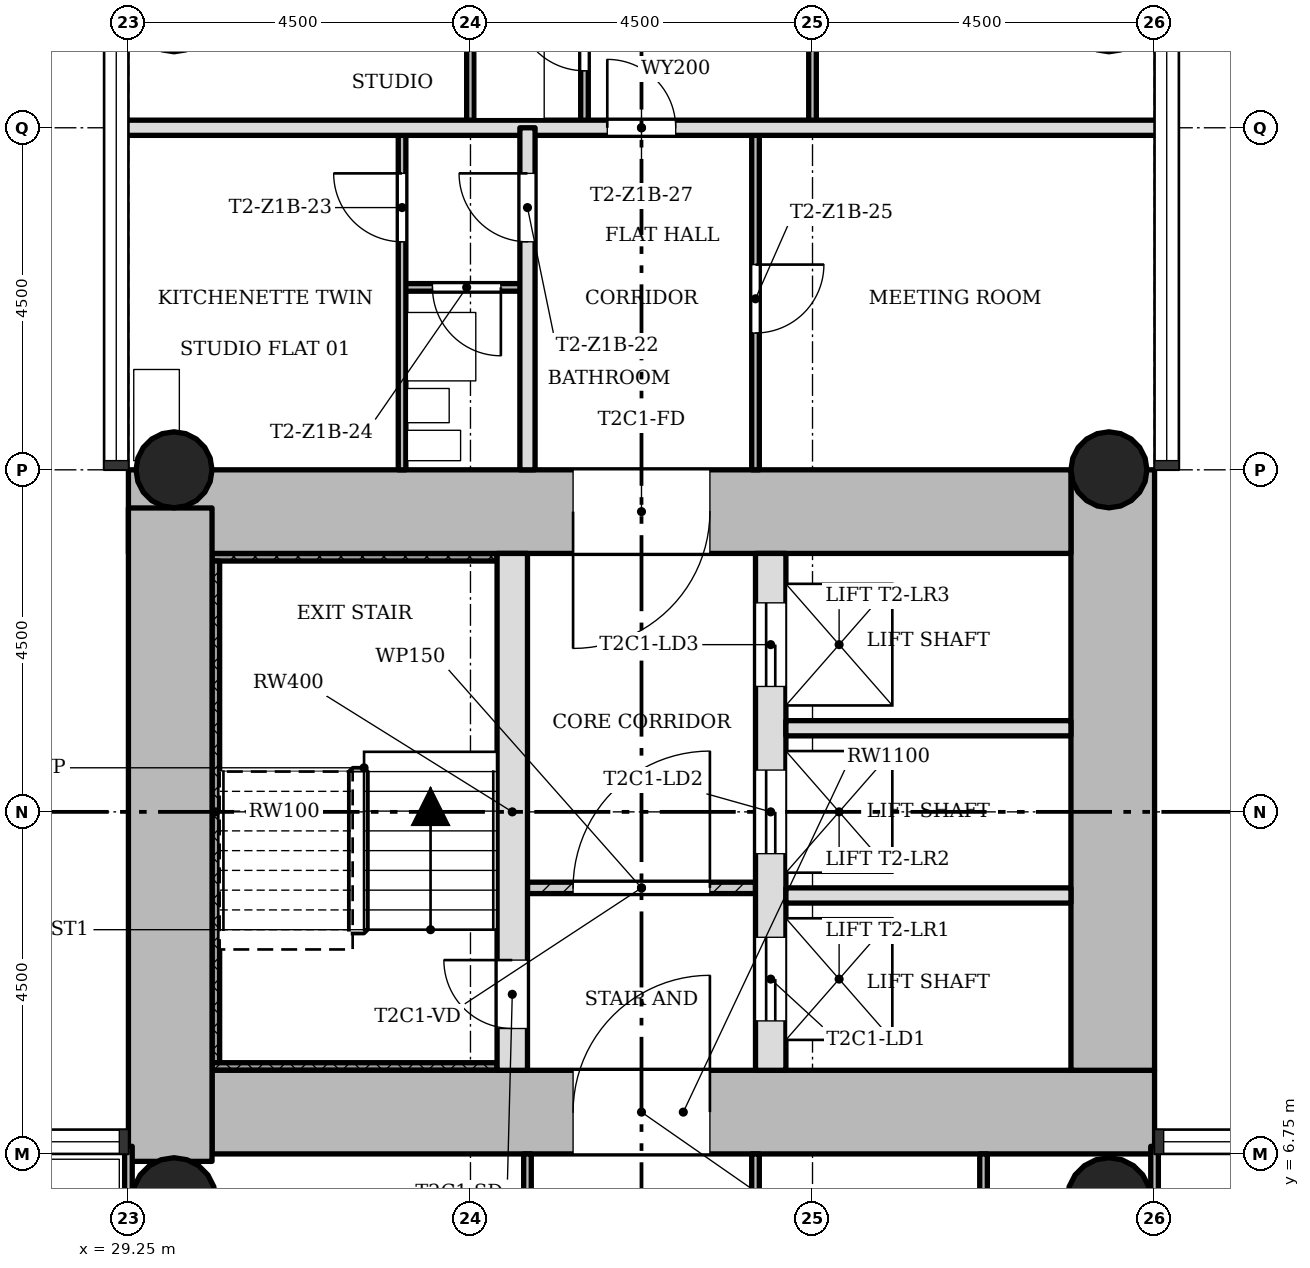
"""IFC4 building model, lengths in metres.
Left out: names, types, materials, properties, quantities, classifications, styles, units other than length and angle.
Written with IfcOpenShell. Run it as: python <this file> out.ifc"""

import sys

from ifc_helpers import new_model, si_unit, direction, frame, frame_2d, origin, origin_2d, place, context, subcontext, project, spatial, rectangle, hollow_circle, extrude, element, fill, save


model = new_model("IFC4")
c1 = context("Model", 3, precision=1e-05, world=origin(), true_north=direction((0.0, 1.0)))
c2 = subcontext(c1, "Body", "Model", "MODEL_VIEW")
j1 = project(units=[si_unit("LENGTHUNIT", "METRE"), si_unit("PLANEANGLEUNIT", "RADIAN")], contexts=[c1])
p1 = place(None, origin())
s1 = spatial("IfcSite", under=j1, at=p1, CompositionType="ELEMENT")
p2 = place(p1, origin())
s2 = spatial("IfcBuilding", under=s1, at=p2, CompositionType="ELEMENT")
p3 = place(p2, frame((0.0, 0.0, 34.7)))
s3 = spatial("IfcBuildingStorey", under=s2, at=p3, CompositionType="ELEMENT", Elevation=34.7)
p4 = place(p3, frame((30.35, 7.3, 0.0), z_axis=(0.0, 0.0, 1.0), x_axis=(1.0, 0.0, 0.0)))
e1 = element("IfcWall", 1, at=p4, inside=s3, PredefinedType="SHEAR", context=c2, shape_type="SweptSolid", body=[
    extrude(rectangle(XDim=12.4, YDim=1.1, at=frame_2d((6.2, 0.0))), origin(), (0.0, 0.0, 1.0), 3.4),
])
p5 = place(p4, frame((4.75, 0.0, 0.0)))
e2 = element("IfcOpeningElement", 2, at=p5, cuts=e1, PredefinedType="OPENING", context=c2, shape_type="SweptSolid", body=[
    extrude(rectangle(XDim=1.8, YDim=2.1, at=frame_2d((0.9, 1.05))), frame((0.0, 0.56, 0.0), z_axis=(0.0, -1.0, 0.0), x_axis=(1.0, 0.0, 0.0)), (0.0, 0.0, 1.0), 1.12),
])
p6 = place(p3, frame((42.2, 7.85, 0.0), z_axis=(0.0, 0.0, 1.0), x_axis=(0.0, 1.0, 0.0)))
e3 = element("IfcWall", 3, at=p6, inside=s3, PredefinedType="SHEAR", context=c2, shape_type="SweptSolid", body=[
    extrude(rectangle(XDim=7.9, YDim=1.1, at=frame_2d((3.95, 0.0))), origin(), (0.0, 0.0, 1.0), 3.4),
])
p7 = place(p3, frame((41.65, 15.2, 0.0), z_axis=(0.0, 0.0, 1.0), x_axis=(-1.0, 0.0, 0.0)))
e4 = element("IfcWall", 4, at=p7, inside=s3, PredefinedType="SHEAR", context=c2, shape_type="SweptSolid", body=[
    extrude(rectangle(XDim=12.4, YDim=1.1, at=frame_2d((6.2, 0.0))), origin(), (0.0, 0.0, 1.0), 3.4),
])
p8 = place(p7, frame((4.75, 0.0, 0.0)))
e5 = element("IfcOpeningElement", 5, at=p8, cuts=e4, PredefinedType="OPENING", context=c2, shape_type="SweptSolid", body=[
    extrude(rectangle(XDim=1.8, YDim=2.1, at=frame_2d((0.9, 1.05))), frame((0.0, 0.56, 0.0), z_axis=(0.0, -1.0, 0.0), x_axis=(1.0, 0.0, 0.0)), (0.0, 0.0, 1.0), 1.12),
])
p9 = place(p3, frame((29.8, 15.248, 0.0), z_axis=(0.0, 0.0, 1.0), x_axis=(0.0, -1.0, 0.0)))
e6 = element("IfcWall", 6, at=p9, inside=s3, PredefinedType="SHEAR", context=c2, shape_type="SweptSolid", body=[
    extrude(rectangle(XDim=8.596, YDim=1.1, at=frame_2d((4.298, 0.0))), origin(), (0.0, 0.0, 1.0), 3.4),
])
p10 = place(p3, frame((34.3, 7.85, 0.0), z_axis=(0.0, 0.0, 1.0), x_axis=(0.0, 1.0, 0.0)))
e7 = element("IfcWall", 7, at=p10, inside=s3, PredefinedType="SHEAR", context=c2, shape_type="SweptSolid", body=[
    extrude(rectangle(XDim=6.8, YDim=0.4, at=frame_2d((3.4, 0.0))), origin(), (0.0, 0.0, 1.0), 3.4),
])
p11 = place(p10, frame((0.55, 0.0, 0.0)))
e8 = element("IfcOpeningElement", 8, at=p11, cuts=e7, PredefinedType="OPENING", context=c2, shape_type="SweptSolid", body=[
    extrude(rectangle(XDim=0.9, YDim=2.1, at=frame_2d((0.45, 1.05))), frame((0.0, 0.21, 0.0), z_axis=(0.0, -1.0, 0.0), x_axis=(1.0, 0.0, 0.0)), (0.0, 0.0, 1.0), 0.42),
])
p12 = place(p3, frame((37.7, 7.85, 0.0), z_axis=(0.0, 0.0, 1.0), x_axis=(0.0, 1.0, 0.0)))
e9 = element("IfcWall", 9, at=p12, inside=s3, PredefinedType="SHEAR", context=c2, shape_type="SweptSolid", body=[
    extrude(rectangle(XDim=6.8, YDim=0.4, at=frame_2d((3.4, 0.0))), origin(), (0.0, 0.0, 1.0), 3.4),
])
p13 = place(p12, frame((0.65, 0.0, 0.0)))
e10 = element("IfcOpeningElement", 10, at=p13, cuts=e9, PredefinedType="OPENING", context=c2, shape_type="SweptSolid", body=[
    extrude(rectangle(XDim=1.1, YDim=2.1, at=frame_2d((0.55, 1.05))), frame((0.0, 0.21, 0.0), z_axis=(0.0, -1.0, 0.0), x_axis=(1.0, 0.0, 0.0)), (0.0, 0.0, 1.0), 0.42),
])
p14 = place(p12, frame((2.85, 0.0, 0.0)))
e11 = element("IfcOpeningElement", 11, at=p14, cuts=e9, PredefinedType="OPENING", context=c2, shape_type="SweptSolid", body=[
    extrude(rectangle(XDim=1.1, YDim=2.1, at=frame_2d((0.55, 1.05))), frame((0.0, 0.21, 0.0), z_axis=(0.0, -1.0, 0.0), x_axis=(1.0, 0.0, 0.0)), (0.0, 0.0, 1.0), 0.42),
])
p15 = place(p12, frame((5.05, 0.0, 0.0)))
e12 = element("IfcOpeningElement", 12, at=p15, cuts=e9, PredefinedType="OPENING", context=c2, shape_type="SweptSolid", body=[
    extrude(rectangle(XDim=1.1, YDim=2.1, at=frame_2d((0.55, 1.05))), frame((0.0, 0.21, 0.0), z_axis=(0.0, -1.0, 0.0), x_axis=(1.0, 0.0, 0.0)), (0.0, 0.0, 1.0), 0.42),
])
for number, where, z_axis, x_axis in (
    (13, (42.15, 15.75, 0.0), (0.0, 0.0, 1.0), (1.0, 0.0, 0.0)),
    (14, (29.85, 15.75, 0.0), (0.0, 0.0, 1.0), (1.0, 0.0, 0.0)),
):
    element("IfcColumn", number, at=place(p3, frame(where, z_axis=z_axis, x_axis=x_axis)), inside=s3, PredefinedType="COLUMN", context=c2, shape_type="SweptSolid", body=[
        extrude(hollow_circle(Radius=0.5, WallThickness=0.036, at=origin_2d()), origin(), (0.0, 0.0, 1.0), 3.4),
    ])
for number, where, z_axis, x_axis in (
    (15, (42.15, 6.15, 0.0), (0.0, 0.0, 1.0), (1.0, 0.0, 0.0)),
    (16, (29.85, 6.15, 0.0), (0.0, 0.0, 1.0), (1.0, 0.0, 0.0)),
):
    element("IfcColumn", number, at=place(p3, frame(where, z_axis=z_axis, x_axis=x_axis)), inside=s3, PredefinedType="COLUMN", context=c2, shape_type="SweptSolid", body=[
        extrude(hollow_circle(Radius=0.55, WallThickness=0.04, at=origin_2d()), origin(), (0.0, 0.0, 1.0), 3.4),
    ])
p16 = place(p3, frame((37.5, 10.25, 0.0), z_axis=(0.0, 0.0, 1.0), x_axis=(-1.0, 0.0, 0.0)))
e17 = element("IfcWall", 17, at=p16, inside=s3, PredefinedType="PARTITIONING", context=c2, shape_type="SweptSolid", body=[
    extrude(rectangle(XDim=3.0, YDim=0.15, at=frame_2d((1.5, 0.0))), origin(), (0.0, 0.0, 1.0), 3.0),
])
p17 = place(p16, frame((0.6, 0.0, 0.0)))
e18 = element("IfcOpeningElement", 18, at=p17, cuts=e17, PredefinedType="OPENING", context=c2, shape_type="SweptSolid", body=[
    extrude(rectangle(XDim=1.8, YDim=2.1, at=frame_2d((0.9, 1.05))), frame((0.0, 0.085, 0.0), z_axis=(0.0, -1.0, 0.0), x_axis=(1.0, 0.0, 0.0)), (0.0, 0.0, 1.0), 0.17),
])
for number, where, z_axis, x_axis in (
    (19, (41.65, 10.15, 0.0), (0.0, 0.0, 1.0), (-1.0, 0.0, 0.0)),
    (20, (41.65, 12.35, 0.0), (0.0, 0.0, 1.0), (-1.0, 0.0, 0.0)),
):
    element("IfcWall", number, at=place(p3, frame(where, z_axis=z_axis, x_axis=x_axis)), inside=s3, PredefinedType="SOLIDWALL", context=c2, shape_type="SweptSolid", body=[
        extrude(rectangle(XDim=3.75, YDim=0.2, at=frame_2d((1.875, 0.0))), origin(), (0.0, 0.0, 1.0), 3.0),
    ])
p18 = place(p3, frame((34.5, 18.15, 0.0), z_axis=(0.0, 0.0, 1.0), x_axis=(-1.0, 0.0, 0.0)))
e21 = element("IfcWall", 21, at=p18, inside=s3, PredefinedType="PARTITIONING", context=c2, shape_type="SweptSolid", body=[
    extrude(rectangle(XDim=1.65, YDim=0.1, at=frame_2d((0.825, 0.0))), origin(), (0.0, 0.0, 1.0), 3.0),
])
p19 = place(p18, frame((0.35, 0.0, 0.0)))
e22 = element("IfcOpeningElement", 22, at=p19, cuts=e21, PredefinedType="OPENING", context=c2, shape_type="SweptSolid", body=[
    extrude(rectangle(XDim=0.9, YDim=2.1, at=frame_2d((0.45, 1.05))), frame((0.0, 0.06, 0.0), z_axis=(0.0, -1.0, 0.0), x_axis=(1.0, 0.0, 0.0)), (0.0, 0.0, 1.0), 0.12),
])
p20 = place(p3, frame((42.85, 20.25, 0.0), z_axis=(0.0, 0.0, 1.0), x_axis=(-1.0, 0.0, 0.0)))
e23 = element("IfcWall", 23, at=p20, inside=s3, PredefinedType="SOLIDWALL", context=c2, shape_type="SweptSolid", body=[
    extrude(rectangle(XDim=13.7, YDim=0.2, at=frame_2d((6.85, 0.0))), origin(), (0.0, 0.0, 1.0), 3.0),
])
p21 = place(p20, frame((6.4, 0.0, 0.0)))
e24 = element("IfcOpeningElement", 24, at=p21, cuts=e23, PredefinedType="OPENING", context=c2, shape_type="SweptSolid", body=[
    extrude(rectangle(XDim=0.9, YDim=2.1, at=frame_2d((0.45, 1.05))), frame((0.0, 0.11, 0.0), z_axis=(0.0, -1.0, 0.0), x_axis=(1.0, 0.0, 0.0)), (0.0, 0.0, 1.0), 0.22),
])
p22 = place(p3, frame((42.75, 0.9, 0.0), z_axis=(0.0, 0.0, 1.0), x_axis=(0.0, 1.0, 0.0)))
e25 = element("IfcWall", 25, at=p22, inside=s3, PredefinedType="PARTITIONING", context=c2, shape_type="SweptSolid", body=[
    extrude(rectangle(XDim=5.95, YDim=0.1, at=frame_2d((2.975, 0.0))), origin(), (0.0, 0.0, 1.0), 3.0),
])
p23 = place(p3, frame((40.5, 0.9, 0.0), z_axis=(0.0, 0.0, 1.0), x_axis=(0.0, 1.0, 0.0)))
e26 = element("IfcWall", 26, at=p23, inside=s3, PredefinedType="PARTITIONING", context=c2, shape_type="SweptSolid", body=[
    extrude(rectangle(XDim=5.85, YDim=0.1, at=frame_2d((2.925, 0.0))), origin(), (0.0, 0.0, 1.0), 3.0),
])
p24 = place(p3, frame((38.25, 20.25, 0.0), z_axis=(0.0, 0.0, 1.0), x_axis=(0.0, 1.0, 0.0)))
e27 = element("IfcWall", 27, at=p24, inside=s3, PredefinedType="PARTITIONING", context=c2, shape_type="SweptSolid", body=[
    extrude(rectangle(XDim=4.6, YDim=0.1, at=frame_2d((2.3, 0.0))), origin(), (0.0, 0.0, 1.0), 3.0),
])
p25 = place(p24, frame((1.8, 0.0, 0.0)))
e28 = element("IfcOpeningElement", 28, at=p25, cuts=e27, PredefinedType="OPENING", context=c2, shape_type="SweptSolid", body=[
    extrude(rectangle(XDim=0.9, YDim=2.1, at=frame_2d((0.45, 1.05))), frame((0.0, 0.06, 0.0), z_axis=(0.0, -1.0, 0.0), x_axis=(1.0, 0.0, 0.0)), (0.0, 0.0, 1.0), 0.12),
])
p26 = place(p3, frame((37.5, 0.9, 0.0), z_axis=(0.0, 0.0, 1.0), x_axis=(0.0, 1.0, 0.0)))
e29 = element("IfcWall", 29, at=p26, inside=s3, PredefinedType="PARTITIONING", context=c2, shape_type="SweptSolid", body=[
    extrude(rectangle(XDim=5.85, YDim=0.1, at=frame_2d((2.925, 0.0))), origin(), (0.0, 0.0, 1.0), 3.0),
])
p27 = place(p26, frame((2.475, 0.0, 0.0)))
e30 = element("IfcOpeningElement", 30, at=p27, cuts=e29, PredefinedType="OPENING", context=c2, shape_type="SweptSolid", body=[
    extrude(rectangle(XDim=0.9, YDim=2.1, at=frame_2d((0.45, 1.05))), frame((0.0, 0.06, 0.0), z_axis=(0.0, -1.0, 0.0), x_axis=(1.0, 0.0, 0.0)), (0.0, 0.0, 1.0), 0.12),
])
p28 = place(p3, frame((37.5, 15.75, 0.0), z_axis=(0.0, 0.0, 1.0), x_axis=(0.0, 1.0, 0.0)))
e31 = element("IfcWall", 31, at=p28, inside=s3, PredefinedType="PARTITIONING", context=c2, shape_type="SweptSolid", body=[
    extrude(rectangle(XDim=4.5, YDim=0.1, at=frame_2d((2.25, 0.0))), origin(), (0.0, 0.0, 1.0), 3.0),
])
p29 = place(p28, frame((1.8, 0.0, 0.0)))
e32 = element("IfcOpeningElement", 32, at=p29, cuts=e31, PredefinedType="OPENING", context=c2, shape_type="SweptSolid", body=[
    extrude(rectangle(XDim=0.9, YDim=2.1, at=frame_2d((0.45, 1.05))), frame((0.0, 0.06, 0.0), z_axis=(0.0, -1.0, 0.0), x_axis=(1.0, 0.0, 0.0)), (0.0, 0.0, 1.0), 0.12),
])
p30 = place(p3, frame((35.25, 20.25, 0.0), z_axis=(0.0, 0.0, 1.0), x_axis=(0.0, 1.0, 0.0)))
e33 = element("IfcWall", 33, at=p30, inside=s3, PredefinedType="PARTITIONING", context=c2, shape_type="SweptSolid", body=[
    extrude(rectangle(XDim=2.4, YDim=0.1, at=frame_2d((1.2, 0.0))), origin(), (0.0, 0.0, 1.0), 3.0),
])
p31 = place(p30, frame((0.75, 0.0, 0.0)))
e34 = element("IfcOpeningElement", 34, at=p31, cuts=e33, PredefinedType="OPENING", context=c2, shape_type="SweptSolid", body=[
    extrude(rectangle(XDim=0.9, YDim=2.1, at=frame_2d((0.45, 1.05))), frame((0.0, 0.06, 0.0), z_axis=(0.0, -1.0, 0.0), x_axis=(1.0, 0.0, 0.0)), (0.0, 0.0, 1.0), 0.12),
])
p32 = place(p3, frame((34.5, 0.9, 0.0), z_axis=(0.0, 0.0, 1.0), x_axis=(0.0, 1.0, 0.0)))
e35 = element("IfcWall", 35, at=p32, inside=s3, PredefinedType="PARTITIONING", context=c2, shape_type="SweptSolid", body=[
    extrude(rectangle(XDim=5.85, YDim=0.1, at=frame_2d((2.925, 0.0))), origin(), (0.0, 0.0, 1.0), 3.0),
])
p33 = place(p32, frame((3.675, 0.0, 0.0)))
e36 = element("IfcOpeningElement", 36, at=p33, cuts=e35, PredefinedType="OPENING", context=c2, shape_type="SweptSolid", body=[
    extrude(rectangle(XDim=0.9, YDim=2.1, at=frame_2d((0.45, 1.05))), frame((0.0, 0.06, 0.0), z_axis=(0.0, -1.0, 0.0), x_axis=(1.0, 0.0, 0.0)), (0.0, 0.0, 1.0), 0.12),
])
p34 = place(p3, frame((34.5, 15.75, 0.0), z_axis=(0.0, 0.0, 1.0), x_axis=(0.0, 1.0, 0.0)))
e37 = element("IfcWall", 37, at=p34, inside=s3, PredefinedType="SOLIDWALL", context=c2, shape_type="SweptSolid", body=[
    extrude(rectangle(XDim=4.5, YDim=0.2, at=frame_2d((2.25, 0.0))), origin(), (0.0, 0.0, 1.0), 3.0),
])
p35 = place(p34, frame((3.0, 0.0, 0.0)))
e38 = element("IfcOpeningElement", 38, at=p35, cuts=e37, PredefinedType="OPENING", context=c2, shape_type="SweptSolid", body=[
    extrude(rectangle(XDim=0.9, YDim=2.1, at=frame_2d((0.45, 1.05))), frame((0.0, 0.11, 0.0), z_axis=(0.0, -1.0, 0.0), x_axis=(1.0, 0.0, 0.0)), (0.0, 0.0, 1.0), 0.22),
])
p36 = place(p3, frame((33.75, 20.25, 0.0), z_axis=(0.0, 0.0, 1.0), x_axis=(0.0, 1.0, 0.0)))
e39 = element("IfcWall", 39, at=p36, inside=s3, PredefinedType="PARTITIONING", context=c2, shape_type="SweptSolid", body=[
    extrude(rectangle(XDim=4.6, YDim=0.1, at=frame_2d((2.3, 0.0))), origin(), (0.0, 0.0, 1.0), 3.0),
])
p37 = place(p36, frame((2.45, 0.0, 0.0)))
e40 = element("IfcOpeningElement", 40, at=p37, cuts=e39, PredefinedType="OPENING", context=c2, shape_type="SweptSolid", body=[
    extrude(rectangle(XDim=0.9, YDim=2.1, at=frame_2d((0.45, 1.05))), frame((0.0, 0.06, 0.0), z_axis=(0.0, -1.0, 0.0), x_axis=(1.0, 0.0, 0.0)), (0.0, 0.0, 1.0), 0.12),
])
p38 = place(p3, frame((32.85, 15.75, 0.0), z_axis=(0.0, 0.0, 1.0), x_axis=(0.0, 1.0, 0.0)))
e41 = element("IfcWall", 41, at=p38, inside=s3, PredefinedType="PARTITIONING", context=c2, shape_type="SweptSolid", body=[
    extrude(rectangle(XDim=4.5, YDim=0.1, at=frame_2d((2.25, 0.0))), origin(), (0.0, 0.0, 1.0), 3.0),
])
p39 = place(p38, frame((3.0, 0.0, 0.0)))
e42 = element("IfcOpeningElement", 42, at=p39, cuts=e41, PredefinedType="OPENING", context=c2, shape_type="SweptSolid", body=[
    extrude(rectangle(XDim=0.9, YDim=2.1, at=frame_2d((0.45, 1.05))), frame((0.0, 0.06, 0.0), z_axis=(0.0, -1.0, 0.0), x_axis=(1.0, 0.0, 0.0)), (0.0, 0.0, 1.0), 0.12),
])
p40 = place(p3, frame((29.25, 0.9, 0.0), z_axis=(0.0, 0.0, 1.0), x_axis=(0.0, 1.0, 0.0)))
e43 = element("IfcWall", 43, at=p40, inside=s3, PredefinedType="PARTITIONING", context=c2, shape_type="SweptSolid", body=[
    extrude(rectangle(XDim=5.95, YDim=0.1, at=frame_2d((2.975, 0.0))), origin(), (0.0, 0.0, 1.0), 3.0),
])
p41 = place(p3, frame((34.1, 14.6, 0.0), z_axis=(0.0, 0.0, 1.0), x_axis=(-1.0, 0.0, 0.0)))
e44 = element("IfcWall", 44, at=p41, inside=s3, PredefinedType="SHEAR", context=c2, shape_type="SweptSolid", body=[
    extrude(rectangle(XDim=3.75, YDim=0.1, at=frame_2d((1.875, 0.0))), origin(), (0.0, 0.0, 1.0), 3.4),
])
p42 = place(p3, frame((30.4, 7.95, 0.0), z_axis=(0.0, 0.0, 1.0), x_axis=(0.0, 1.0, 0.0)))
e45 = element("IfcWall", 45, at=p42, inside=s3, PredefinedType="SHEAR", context=c2, shape_type="SweptSolid", body=[
    extrude(rectangle(XDim=6.6, YDim=0.1, at=frame_2d((3.3, 0.0))), origin(), (0.0, 0.0, 1.0), 3.4),
])
p43 = place(p3, frame((34.1, 7.9, 0.0), z_axis=(0.0, 0.0, 1.0), x_axis=(-1.0, 0.0, 0.0)))
e46 = element("IfcWall", 46, at=p43, inside=s3, PredefinedType="SHEAR", context=c2, shape_type="SweptSolid", body=[
    extrude(rectangle(XDim=3.75, YDim=0.1, at=frame_2d((1.875, 0.0))), origin(), (0.0, 0.0, 1.0), 3.4),
])
p44 = place(p17, origin())
e47 = element("IfcDoor", 47, at=p44, inside=s3, OperationType="SINGLE_SWING_LEFT", PredefinedType="DOOR", context=c2, shape_type="SweptSolid", body=[
    extrude(rectangle(XDim=1.8, YDim=2.1, at=frame_2d((0.9, 1.05))), frame((0.0, 0.025, 0.0), z_axis=(0.0, -1.0, 0.0), x_axis=(1.0, 0.0, 0.0)), (0.0, 0.0, 1.0), 0.05),
])
fill(e18, e47)
p45 = place(p35, origin())
e48 = element("IfcDoor", 48, at=p45, inside=s3, OperationType="SINGLE_SWING_LEFT", PredefinedType="DOOR", context=c2, shape_type="SweptSolid", body=[
    extrude(rectangle(XDim=0.9, YDim=2.1, at=frame_2d((0.45, 1.05))), frame((0.0, 0.025, 0.0), z_axis=(0.0, -1.0, 0.0), x_axis=(1.0, 0.0, 0.0)), (0.0, 0.0, 1.0), 0.05),
])
fill(e38, e48)
p46 = place(p39, origin())
e49 = element("IfcDoor", 49, at=p46, inside=s3, OperationType="SINGLE_SWING_LEFT", PredefinedType="DOOR", context=c2, shape_type="SweptSolid", body=[
    extrude(rectangle(XDim=0.9, YDim=2.1, at=frame_2d((0.45, 1.05))), frame((0.0, 0.025, 0.0), z_axis=(0.0, -1.0, 0.0), x_axis=(1.0, 0.0, 0.0)), (0.0, 0.0, 1.0), 0.05),
])
fill(e42, e49)
p47 = place(p19, origin())
e50 = element("IfcDoor", 50, at=p47, inside=s3, OperationType="SINGLE_SWING_RIGHT", PredefinedType="DOOR", context=c2, shape_type="SweptSolid", body=[
    extrude(rectangle(XDim=0.9, YDim=2.1, at=frame_2d((0.45, 1.05))), frame((0.0, 0.025, 0.0), z_axis=(0.0, -1.0, 0.0), x_axis=(1.0, 0.0, 0.0)), (0.0, 0.0, 1.0), 0.05),
])
fill(e22, e50)
p48 = place(p29, origin())
e51 = element("IfcDoor", 51, at=p48, inside=s3, OperationType="SINGLE_SWING_RIGHT", PredefinedType="DOOR", context=c2, shape_type="SweptSolid", body=[
    extrude(rectangle(XDim=0.9, YDim=2.1, at=frame_2d((0.45, 1.05))), frame((0.0, 0.025, 0.0), z_axis=(0.0, -1.0, 0.0), x_axis=(1.0, 0.0, 0.0)), (0.0, 0.0, 1.0), 0.05),
])
fill(e32, e51)
p49 = place(p31, origin())
e52 = element("IfcDoor", 52, at=p49, inside=s3, OperationType="SINGLE_SWING_LEFT", PredefinedType="DOOR", context=c2, shape_type="SweptSolid", body=[
    extrude(rectangle(XDim=0.9, YDim=2.1, at=frame_2d((0.45, 1.05))), frame((0.0, 0.025, 0.0), z_axis=(0.0, -1.0, 0.0), x_axis=(1.0, 0.0, 0.0)), (0.0, 0.0, 1.0), 0.05),
])
fill(e34, e52)
p50 = place(p21, origin())
e53 = element("IfcDoor", 53, at=p50, inside=s3, OperationType="SINGLE_SWING_RIGHT", PredefinedType="DOOR", context=c2, shape_type="SweptSolid", body=[
    extrude(rectangle(XDim=0.9, YDim=2.1, at=frame_2d((0.45, 1.05))), frame((0.0, 0.025, 0.0), z_axis=(0.0, -1.0, 0.0), x_axis=(1.0, 0.0, 0.0)), (0.0, 0.0, 1.0), 0.05),
])
fill(e24, e53)
p51 = place(p11, origin())
e54 = element("IfcDoor", 54, at=p51, inside=s3, OperationType="SINGLE_SWING_LEFT", PredefinedType="DOOR", context=c2, shape_type="SweptSolid", body=[
    extrude(rectangle(XDim=0.9, YDim=2.1, at=frame_2d((0.45, 1.05))), frame((0.0, 0.025, 0.0), z_axis=(0.0, -1.0, 0.0), x_axis=(1.0, 0.0, 0.0)), (0.0, 0.0, 1.0), 0.05),
])
fill(e8, e54)
p52 = place(p13, origin())
e55 = element("IfcDoor", 55, at=p52, inside=s3, OperationType="SLIDING_TO_LEFT", PredefinedType="DOOR", context=c2, shape_type="SweptSolid", body=[
    extrude(rectangle(XDim=1.1, YDim=2.1, at=frame_2d((0.55, 1.05))), frame((0.0, 0.025, 0.0), z_axis=(0.0, -1.0, 0.0), x_axis=(1.0, 0.0, 0.0)), (0.0, 0.0, 1.0), 0.05),
])
fill(e10, e55)
p53 = place(p14, origin())
e56 = element("IfcDoor", 56, at=p53, inside=s3, OperationType="SLIDING_TO_LEFT", PredefinedType="DOOR", context=c2, shape_type="SweptSolid", body=[
    extrude(rectangle(XDim=1.1, YDim=2.1, at=frame_2d((0.55, 1.05))), frame((0.0, 0.025, 0.0), z_axis=(0.0, -1.0, 0.0), x_axis=(1.0, 0.0, 0.0)), (0.0, 0.0, 1.0), 0.05),
])
fill(e11, e56)
p54 = place(p15, origin())
e57 = element("IfcDoor", 57, at=p54, inside=s3, OperationType="SLIDING_TO_LEFT", PredefinedType="DOOR", context=c2, shape_type="SweptSolid", body=[
    extrude(rectangle(XDim=1.1, YDim=2.1, at=frame_2d((0.55, 1.05))), frame((0.0, 0.025, 0.0), z_axis=(0.0, -1.0, 0.0), x_axis=(1.0, 0.0, 0.0)), (0.0, 0.0, 1.0), 0.05),
])
fill(e12, e57)
p55 = place(p5, origin())
e58 = element("IfcDoor", 58, at=p55, inside=s3, OperationType="SINGLE_SWING_LEFT", PredefinedType="DOOR", context=c2, shape_type="SweptSolid", body=[
    extrude(rectangle(XDim=1.8, YDim=2.1, at=frame_2d((0.9, 1.05))), frame((0.0, 0.025, 0.0), z_axis=(0.0, -1.0, 0.0), x_axis=(1.0, 0.0, 0.0)), (0.0, 0.0, 1.0), 0.05),
])
fill(e2, e58)
p56 = place(p8, origin())
e59 = element("IfcDoor", 59, at=p56, inside=s3, OperationType="SINGLE_SWING_LEFT", PredefinedType="DOOR", context=c2, shape_type="SweptSolid", body=[
    extrude(rectangle(XDim=1.8, YDim=2.1, at=frame_2d((0.9, 1.05))), frame((0.0, 0.025, 0.0), z_axis=(0.0, -1.0, 0.0), x_axis=(1.0, 0.0, 0.0)), (0.0, 0.0, 1.0), 0.05),
])
fill(e5, e59)
save(model, sys.argv[1])
